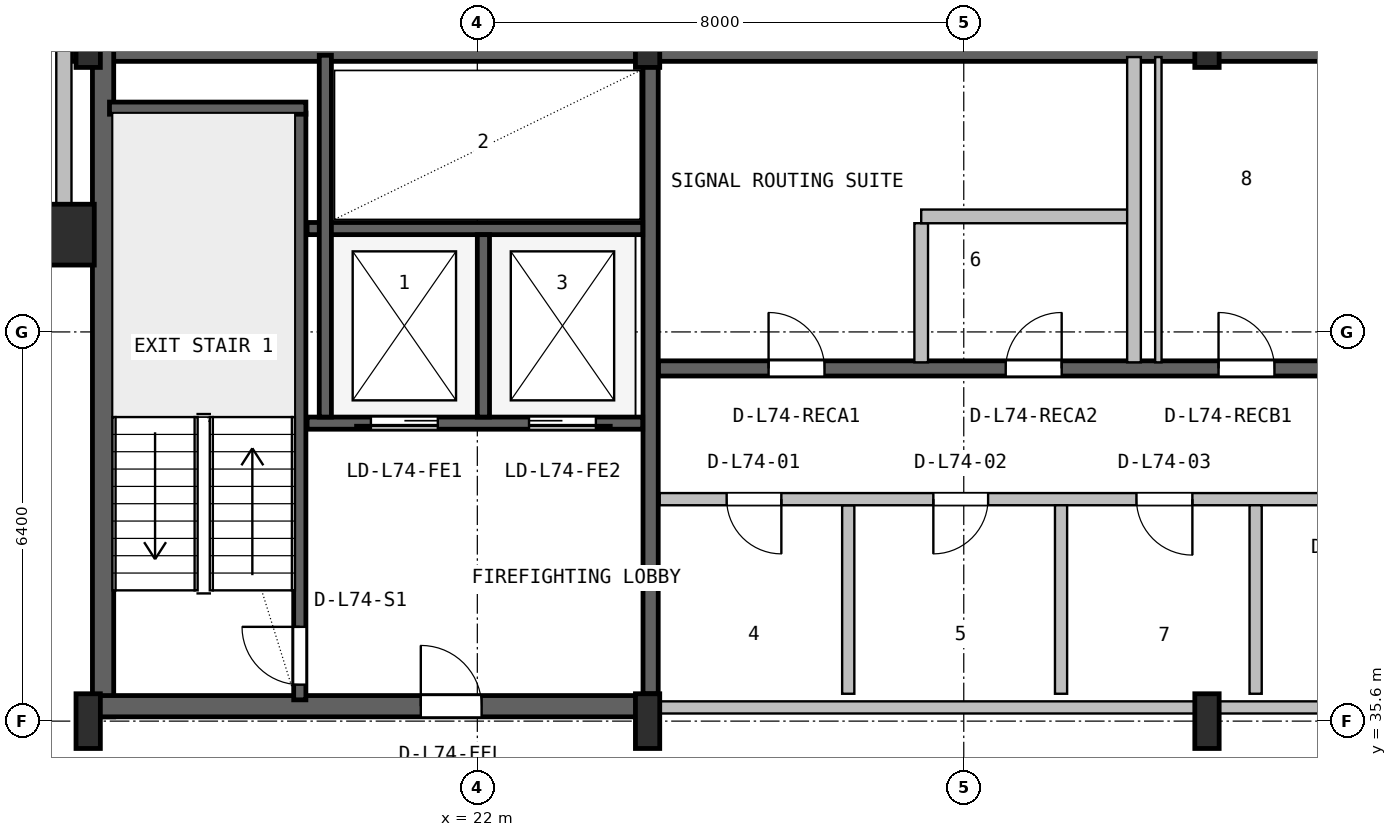
"""IFC4 building model, lengths in metres.
Left out: names, types, materials, properties, quantities, classifications, styles, units other than length and angle.
Written with IfcOpenShell. Run it as: python <this file> out.ifc"""

import sys

from ifc_helpers import new_model, si_unit, direction, frame, frame_2d, origin, origin_2d, place, context, subcontext, project, spatial, rectangle, hollow_rectangle, i_section, extrude, source, transform, mapped, element, fill, save


model = new_model("IFC4")
c1 = context("Model", 3, precision=1e-05, world=origin(), true_north=direction((0.0, 1.0)))
c2 = subcontext(c1, "Body", "Model", "MODEL_VIEW")
j1 = project(units=[si_unit("LENGTHUNIT", "METRE"), si_unit("PLANEANGLEUNIT", "RADIAN")], contexts=[c1])
p1 = place(None, origin())
s1 = spatial("IfcSite", under=j1, at=p1, CompositionType="ELEMENT")
p2 = place(p1, origin())
s2 = spatial("IfcBuilding", under=s1, at=p2, CompositionType="ELEMENT")
p3 = place(p2, frame((0.0, 0.0, 296.4)))
s3 = spatial("IfcBuildingStorey", under=s2, at=p3, CompositionType="ELEMENT", Elevation=296.4)
p4 = place(p3, frame((15.325, 46.625, 0.0), z_axis=(0.0, 0.0, 1.0), x_axis=(1.0, 0.0, 0.0)))
e1 = element("IfcWall", 1, at=p4, inside=s3, PredefinedType="SHEAR", context=c2, shape_type="SweptSolid", body=[
    extrude(rectangle(XDim=37.35, YDim=0.35, at=frame_2d((18.675, 0.0))), origin(), (0.0, 0.0, 1.0), 3.52),
])
p5 = place(p3, frame((15.845, 35.67, 0.0), z_axis=(0.0, 0.0, 1.0), x_axis=(0.0, 1.0, 0.0)))
e2 = element("IfcWall", 2, at=p5, inside=s3, PredefinedType="SHEAR", context=c2, shape_type="SweptSolid", body=[
    extrude(rectangle(XDim=11.13, YDim=0.35, at=frame_2d((5.565, 0.0))), origin(), (0.0, 0.0, 1.0), 3.52),
])
p6 = place(p3, frame((15.67, 35.845, 0.0), z_axis=(0.0, 0.0, 1.0), x_axis=(1.0, 0.0, 0.0)))
e3 = element("IfcWall", 3, at=p6, inside=s3, PredefinedType="SHEAR", context=c2, shape_type="SweptSolid", body=[
    extrude(rectangle(XDim=9.13, YDim=0.35, at=frame_2d((4.565, 0.0))), origin(), (0.0, 0.0, 1.0), 3.52),
])
p7 = place(p6, frame((5.4, 0.0, 0.0)))
e4 = element("IfcOpeningElement", 4, at=p7, cuts=e3, PredefinedType="OPENING", context=c2, shape_type="SweptSolid", body=[
    extrude(rectangle(XDim=1.0, YDim=2.1, at=frame_2d((0.5, 1.05))), frame((0.0, 0.185, 0.0), z_axis=(0.0, -1.0, 0.0), x_axis=(1.0, 0.0, 0.0)), (0.0, 0.0, 1.0), 0.37),
])
m1 = source(origin(), c2, "Body", "SweptSolid", [
    extrude(i_section(OverallWidth=0.4, OverallDepth=0.9, WebThickness=0.016, FlangeThickness=0.028, FilletRadius=0.016, at=origin_2d()), origin(), (0.0, 0.0, 1.0), 3.8),
])
for number, where, z_axis, x_axis in (
    (5, (15.6, 35.6, 0.0), (0.0, 0.0, 1.0), (1.0, 0.0, 0.0)),
    (6, (15.6, 46.8, 0.0), (0.0, 0.0, 1.0), (1.0, 0.0, 0.0)),
    (7, (24.8, 35.6, 0.0), (0.0, 0.0, 1.0), (1.0, 0.0, 0.0)),
    (8, (24.8, 46.8, 0.0), (0.0, 0.0, 1.0), (1.0, 0.0, 0.0)),
    (9, (34.0, 35.6, 0.0), (0.0, 0.0, 1.0), (1.0, 0.0, 0.0)),
    (10, (34.0, 46.8, 0.0), (0.0, 0.0, 1.0), (1.0, 0.0, 0.0)),
):
    element("IfcColumn", number, at=place(p3, frame(where, z_axis=z_axis, x_axis=x_axis)), inside=s3, PredefinedType="COLUMN", context=c2, shape_type="MappedRepresentation", body=[
        mapped(m1, transform((0.0, 0.0, 0.0), x_axis=(1.0, 0.0, 0.0), y_axis=(0.0, 1.0, 0.0), z_axis=(0.0, 0.0, 1.0), scale=1.0)),
    ])
m2 = source(origin(), c2, "Body", "SweptSolid", [
    extrude(hollow_rectangle(XDim=1.0, YDim=1.0, WallThickness=0.04, at=origin_2d()), origin(), (0.0, 0.0, 1.0), 3.8),
])
p8 = place(p3, frame((15.2, 43.6, 0.0), z_axis=(0.0, 0.0, 1.0), x_axis=(1.0, 0.0, 0.0)))
e11 = element("IfcColumn", 11, at=p8, inside=s3, PredefinedType="COLUMN", context=c2, shape_type="MappedRepresentation", body=[
    mapped(m2, transform((0.0, 0.0, 0.0), x_axis=(1.0, 0.0, 0.0), y_axis=(0.0, 1.0, 0.0), z_axis=(0.0, 0.0, 1.0), scale=1.0)),
])
p9 = place(p3, frame((12.08, 43.6, 0.0), z_axis=(0.0, 0.0, 1.0), x_axis=(1.0, 0.0, 0.0)))
e12 = element("IfcWall", 12, at=p9, inside=s3, PredefinedType="SOLIDWALL", context=c2, shape_type="SweptSolid", body=[
    extrude(rectangle(XDim=2.99, YDim=0.25, at=frame_2d((1.495, 0.0))), origin(), (0.0, 0.0, 1.0), 3.5),
])
p10 = place(p3, frame((15.2, 43.52, 0.0), z_axis=(0.0, 0.0, 1.0), x_axis=(0.0, 1.0, 0.0)))
e13 = element("IfcWall", 13, at=p10, inside=s3, PredefinedType="SOLIDWALL", context=c2, shape_type="SweptSolid", body=[
    extrude(rectangle(XDim=3.2, YDim=0.25, at=frame_2d((1.6, 0.0))), origin(), (0.0, 0.0, 1.0), 3.141),
])
p11 = place(p3, frame((19.08, 35.95, 0.0), z_axis=(0.0, 0.0, 1.0), x_axis=(0.0, 1.0, 0.0)))
e14 = element("IfcWall", 14, at=p11, inside=s3, PredefinedType="SHEAR", context=c2, shape_type="SweptSolid", body=[
    extrude(rectangle(XDim=9.65, YDim=0.2, at=frame_2d((4.825, 0.0))), origin(), (0.0, 0.0, 1.0), 3.52),
])
p12 = place(p11, frame((0.25, 0.0, 0.0)))
e15 = element("IfcOpeningElement", 15, at=p12, cuts=e14, PredefinedType="OPENING", context=c2, shape_type="SweptSolid", body=[
    extrude(rectangle(XDim=0.95, YDim=2.1, at=frame_2d((0.475, 1.05))), frame((0.0, 0.11, 0.0), z_axis=(0.0, -1.0, 0.0), x_axis=(1.0, 0.0, 0.0)), (0.0, 0.0, 1.0), 0.22),
])
p13 = place(p3, frame((15.95, 45.68, 0.0), z_axis=(0.0, 0.0, 1.0), x_axis=(1.0, 0.0, 0.0)))
e16 = element("IfcWall", 16, at=p13, inside=s3, PredefinedType="SHEAR", context=c2, shape_type="SweptSolid", body=[
    extrude(rectangle(XDim=3.23, YDim=0.2, at=frame_2d((1.615, 0.0))), origin(), (0.0, 0.0, 1.0), 3.52),
])
p14 = place(p3, frame((24.85, 36.05, 0.0), z_axis=(0.0, 0.0, 1.0), x_axis=(0.0, 1.0, 0.0)))
e17 = element("IfcWall", 17, at=p14, inside=s3, PredefinedType="SHEAR", context=c2, shape_type="SweptSolid", body=[
    extrude(rectangle(XDim=10.45, YDim=0.25, at=frame_2d((5.225, 0.0))), origin(), (0.0, 0.0, 1.0), 3.52),
])
p15 = place(p3, frame((19.2, 40.5, 0.0), z_axis=(0.0, 0.0, 1.0), x_axis=(1.0, 0.0, 0.0)))
e18 = element("IfcWall", 18, at=p15, inside=s3, PredefinedType="SHEAR", context=c2, shape_type="SweptSolid", body=[
    extrude(rectangle(XDim=5.52, YDim=0.2, at=frame_2d((2.76, 0.0))), origin(), (0.0, 0.0, 1.0), 3.52),
])
p16 = place(p15, frame((1.05, 0.0, 0.0)))
e19 = element("IfcOpeningElement", 19, at=p16, cuts=e18, PredefinedType="OPENING", context=c2, shape_type="SweptSolid", body=[
    extrude(rectangle(XDim=1.1, YDim=2.18, at=frame_2d((0.55, 1.09))), frame((0.0, 0.11, 0.0), z_axis=(0.0, -1.0, 0.0), x_axis=(1.0, 0.0, 0.0)), (0.0, 0.0, 1.0), 0.22),
])
p17 = place(p15, frame((3.65, 0.0, 0.0)))
e20 = element("IfcOpeningElement", 20, at=p17, cuts=e18, PredefinedType="OPENING", context=c2, shape_type="SweptSolid", body=[
    extrude(rectangle(XDim=1.1, YDim=2.18, at=frame_2d((0.55, 1.09))), frame((0.0, 0.11, 0.0), z_axis=(0.0, -1.0, 0.0), x_axis=(1.0, 0.0, 0.0)), (0.0, 0.0, 1.0), 0.22),
])
p18 = place(p3, frame((19.2, 43.7, 0.0), z_axis=(0.0, 0.0, 1.0), x_axis=(1.0, 0.0, 0.0)))
e21 = element("IfcWall", 21, at=p18, inside=s3, PredefinedType="SHEAR", context=c2, shape_type="SweptSolid", body=[
    extrude(rectangle(XDim=5.52, YDim=0.2, at=frame_2d((2.76, 0.0))), origin(), (0.0, 0.0, 1.0), 3.52),
])
p19 = place(p3, frame((22.1, 40.6, 0.0), z_axis=(0.0, 0.0, 1.0), x_axis=(0.0, 1.0, 0.0)))
e22 = element("IfcWall", 22, at=p19, inside=s3, PredefinedType="SHEAR", context=c2, shape_type="SweptSolid", body=[
    extrude(rectangle(XDim=3.0, YDim=0.2, at=frame_2d((1.5, 0.0))), origin(), (0.0, 0.0, 1.0), 3.52),
])
p20 = place(p3, frame((19.5, 40.6, 0.0), z_axis=(0.0, 0.0, 1.0), x_axis=(0.0, 1.0, 0.0)))
e23 = element("IfcWall", 23, at=p20, inside=s3, PredefinedType="SHEAR", context=c2, shape_type="SweptSolid", body=[
    extrude(rectangle(XDim=5.95, YDim=0.2, at=frame_2d((2.975, 0.0))), origin(), (0.0, 0.0, 1.0), 3.52),
])
p21 = place(p3, frame((24.98, 41.4, 0.0), z_axis=(0.0, 0.0, 1.0), x_axis=(1.0, 0.0, 0.0)))
e24 = element("IfcWall", 24, at=p21, inside=s3, PredefinedType="SHEAR", context=c2, shape_type="SweptSolid", body=[
    extrude(rectangle(XDim=23.82, YDim=0.25, at=frame_2d((11.91, 0.0))), origin(), (0.0, 0.0, 1.0), 3.52),
])
p22 = place(p21, frame((16.87, 0.0, 0.0)))
e25 = element("IfcOpeningElement", 25, at=p22, cuts=e24, PredefinedType="OPENING", context=c2, shape_type="SweptSolid", body=[
    extrude(rectangle(XDim=1.1, YDim=2.18, at=frame_2d((0.55, 1.09))), frame((0.0, 0.135, 0.0), z_axis=(0.0, -1.0, 0.0), x_axis=(1.0, 0.0, 0.0)), (0.0, 0.0, 1.0), 0.27),
])
p23 = place(p21, frame((19.47, 0.0, 0.0)))
e26 = element("IfcOpeningElement", 26, at=p23, cuts=e24, PredefinedType="OPENING", context=c2, shape_type="SweptSolid", body=[
    extrude(rectangle(XDim=1.1, YDim=2.18, at=frame_2d((0.55, 1.09))), frame((0.0, 0.135, 0.0), z_axis=(0.0, -1.0, 0.0), x_axis=(1.0, 0.0, 0.0)), (0.0, 0.0, 1.0), 0.27),
])
p24 = place(p21, frame((22.07, 0.0, 0.0)))
e27 = element("IfcOpeningElement", 27, at=p24, cuts=e24, PredefinedType="OPENING", context=c2, shape_type="SweptSolid", body=[
    extrude(rectangle(XDim=1.1, YDim=2.18, at=frame_2d((0.55, 1.09))), frame((0.0, 0.135, 0.0), z_axis=(0.0, -1.0, 0.0), x_axis=(1.0, 0.0, 0.0)), (0.0, 0.0, 1.0), 0.27),
])
p25 = place(p21, frame((1.81, 0.0, 0.0)))
e28 = element("IfcOpeningElement", 28, at=p25, cuts=e24, PredefinedType="OPENING", context=c2, shape_type="SweptSolid", body=[
    extrude(rectangle(XDim=0.92, YDim=2.08, at=frame_2d((0.46, 1.04))), frame((0.0, 0.135, 0.0), z_axis=(0.0, -1.0, 0.0), x_axis=(1.0, 0.0, 0.0)), (0.0, 0.0, 1.0), 0.27),
])
p26 = place(p21, frame((5.71, 0.0, 0.0)))
e29 = element("IfcOpeningElement", 29, at=p26, cuts=e24, PredefinedType="OPENING", context=c2, shape_type="SweptSolid", body=[
    extrude(rectangle(XDim=0.92, YDim=2.08, at=frame_2d((0.46, 1.04))), frame((0.0, 0.135, 0.0), z_axis=(0.0, -1.0, 0.0), x_axis=(1.0, 0.0, 0.0)), (0.0, 0.0, 1.0), 0.27),
])
p27 = place(p21, frame((9.21, 0.0, 0.0)))
e30 = element("IfcOpeningElement", 30, at=p27, cuts=e24, PredefinedType="OPENING", context=c2, shape_type="SweptSolid", body=[
    extrude(rectangle(XDim=0.92, YDim=2.08, at=frame_2d((0.46, 1.04))), frame((0.0, 0.135, 0.0), z_axis=(0.0, -1.0, 0.0), x_axis=(1.0, 0.0, 0.0)), (0.0, 0.0, 1.0), 0.27),
])
p28 = place(p21, frame((11.96, 0.0, 0.0)))
e31 = element("IfcOpeningElement", 31, at=p28, cuts=e24, PredefinedType="OPENING", context=c2, shape_type="SweptSolid", body=[
    extrude(rectangle(XDim=0.92, YDim=2.08, at=frame_2d((0.46, 1.04))), frame((0.0, 0.135, 0.0), z_axis=(0.0, -1.0, 0.0), x_axis=(1.0, 0.0, 0.0)), (0.0, 0.0, 1.0), 0.27),
])
p29 = place(p21, frame((14.31, 0.0, 0.0)))
e32 = element("IfcOpeningElement", 32, at=p29, cuts=e24, PredefinedType="OPENING", context=c2, shape_type="SweptSolid", body=[
    extrude(rectangle(XDim=0.92, YDim=2.08, at=frame_2d((0.46, 1.04))), frame((0.0, 0.135, 0.0), z_axis=(0.0, -1.0, 0.0), x_axis=(1.0, 0.0, 0.0)), (0.0, 0.0, 1.0), 0.27),
])
p30 = place(p3, frame((25.0, 35.825, 0.0), z_axis=(0.0, 0.0, 1.0), x_axis=(1.0, 0.0, 0.0)))
e33 = element("IfcWall", 33, at=p30, inside=s3, PredefinedType="SOLIDWALL", context=c2, shape_type="SweptSolid", body=[
    extrude(rectangle(XDim=12.95, YDim=0.2, at=frame_2d((6.475, 0.0))), origin(), (0.0, 0.0, 1.0), 2.545),
])
p31 = place(p3, frame((28.1, 36.05, 0.0), z_axis=(0.0, 0.0, 1.0), x_axis=(0.0, 1.0, 0.0)))
e34 = element("IfcWall", 34, at=p31, inside=s3, PredefinedType="PLUMBINGWALL", context=c2, shape_type="SweptSolid", body=[
    extrude(rectangle(XDim=3.1, YDim=0.2, at=frame_2d((1.55, 0.0))), origin(), (0.0, 0.0, 1.0), 3.5),
])
p32 = place(p3, frame((25.0, 39.25, 0.0), z_axis=(0.0, 0.0, 1.0), x_axis=(1.0, 0.0, 0.0)))
e35 = element("IfcWall", 35, at=p32, inside=s3, PredefinedType="SOLIDWALL", context=c2, shape_type="SweptSolid", body=[
    extrude(rectangle(XDim=12.95, YDim=0.2, at=frame_2d((6.475, 0.0))), origin(), (0.0, 0.0, 1.0), 3.5),
])
p33 = place(p32, frame((1.1, 0.0, 0.0)))
e36 = element("IfcOpeningElement", 36, at=p33, cuts=e35, PredefinedType="OPENING", context=c2, shape_type="SweptSolid", body=[
    extrude(rectangle(XDim=0.9, YDim=2.06, at=frame_2d((0.45, 1.03))), frame((0.0, 0.11, 0.0), z_axis=(0.0, -1.0, 0.0), x_axis=(1.0, 0.0, 0.0)), (0.0, 0.0, 1.0), 0.22),
])
p34 = place(p32, frame((4.5, 0.0, 0.0)))
e37 = element("IfcOpeningElement", 37, at=p34, cuts=e35, PredefinedType="OPENING", context=c2, shape_type="SweptSolid", body=[
    extrude(rectangle(XDim=0.9, YDim=2.06, at=frame_2d((0.45, 1.03))), frame((0.0, 0.11, 0.0), z_axis=(0.0, -1.0, 0.0), x_axis=(1.0, 0.0, 0.0)), (0.0, 0.0, 1.0), 0.22),
])
p35 = place(p32, frame((7.84, 0.0, 0.0)))
e38 = element("IfcOpeningElement", 38, at=p35, cuts=e35, PredefinedType="OPENING", context=c2, shape_type="SweptSolid", body=[
    extrude(rectangle(XDim=0.92, YDim=2.08, at=frame_2d((0.46, 1.04))), frame((0.0, 0.11, 0.0), z_axis=(0.0, -1.0, 0.0), x_axis=(1.0, 0.0, 0.0)), (0.0, 0.0, 1.0), 0.22),
])
p36 = place(p32, frame((10.875, 0.0, 0.0)))
e39 = element("IfcOpeningElement", 39, at=p36, cuts=e35, PredefinedType="OPENING", context=c2, shape_type="SweptSolid", body=[
    extrude(rectangle(XDim=1.2, YDim=2.1, at=frame_2d((0.6, 1.05))), frame((0.0, 0.11, 0.0), z_axis=(0.0, -1.0, 0.0), x_axis=(1.0, 0.0, 0.0)), (0.0, 0.0, 1.0), 0.22),
])
p37 = place(p3, frame((31.6, 36.05, 0.0), z_axis=(0.0, 0.0, 1.0), x_axis=(0.0, 1.0, 0.0)))
e40 = element("IfcWall", 40, at=p37, inside=s3, PredefinedType="PLUMBINGWALL", context=c2, shape_type="SweptSolid", body=[
    extrude(rectangle(XDim=3.1, YDim=0.2, at=frame_2d((1.55, 0.0))), origin(), (0.0, 0.0, 1.0), 3.5),
])
p38 = place(p3, frame((34.8, 36.05, 0.0), z_axis=(0.0, 0.0, 1.0), x_axis=(0.0, 1.0, 0.0)))
e41 = element("IfcWall", 41, at=p38, inside=s3, PredefinedType="SOLIDWALL", context=c2, shape_type="SweptSolid", body=[
    extrude(rectangle(XDim=3.1, YDim=0.2, at=frame_2d((1.55, 0.0))), origin(), (0.0, 0.0, 1.0), 3.5),
])
p39 = place(p3, frame((29.3, 41.5, 0.0), z_axis=(0.0, 0.0, 1.0), x_axis=(0.0, 1.0, 0.0)))
e42 = element("IfcWall", 42, at=p39, inside=s3, PredefinedType="PARTITIONING", context=c2, shape_type="SweptSolid", body=[
    extrude(rectangle(XDim=2.288, YDim=0.225, at=frame_2d((1.144, 0.0))), origin(), (0.0, 0.0, 1.0), 3.5),
])
p40 = place(p3, frame((29.3, 43.9, 0.0), z_axis=(0.0, 0.0, 1.0), x_axis=(1.0, 0.0, 0.0)))
e43 = element("IfcWall", 43, at=p40, inside=s3, PredefinedType="PARTITIONING", context=c2, shape_type="SweptSolid", body=[
    extrude(rectangle(XDim=3.5, YDim=0.225, at=frame_2d((1.75, 0.0))), origin(), (0.0, 0.0, 1.0), 3.5),
])
p41 = place(p3, frame((32.8, 41.5, 0.0), z_axis=(0.0, 0.0, 1.0), x_axis=(0.0, 1.0, 0.0)))
e44 = element("IfcWall", 44, at=p41, inside=s3, PredefinedType="PARTITIONING", context=c2, shape_type="SweptSolid", body=[
    extrude(rectangle(XDim=5.02, YDim=0.225, at=frame_2d((2.51, 0.0))), origin(), (0.0, 0.0, 1.0), 3.5),
])
p42 = place(p3, frame((33.2, 41.5, 0.0), z_axis=(0.0, 0.0, 1.0), x_axis=(0.0, 1.0, 0.0)))
e45 = element("IfcWall", 45, at=p42, inside=s3, PredefinedType="PARTITIONING", context=c2, shape_type="SweptSolid", body=[
    extrude(rectangle(XDim=5.02, YDim=0.105, at=frame_2d((2.51, 0.0))), origin(), (0.0, 0.0, 1.0), 3.5),
])
m3 = source(origin(), c2, "Body", "SweptSolid", [
    extrude(rectangle(XDim=0.95, YDim=2.1, at=frame_2d((0.475, 1.05))), frame((0.0, 0.025, 0.0), z_axis=(0.0, -1.0, 0.0), x_axis=(1.0, 0.0, 0.0)), (0.0, 0.0, 1.0), 0.05),
])
p43 = place(p12, origin())
e46 = element("IfcDoor", 46, at=p43, inside=s3, OperationType="SINGLE_SWING_RIGHT", PredefinedType="DOOR", context=c2, shape_type="MappedRepresentation", body=[
    mapped(m3, transform((0.0, 0.0, 0.0), x_axis=(1.0, 0.0, 0.0), y_axis=(0.0, 1.0, 0.0), z_axis=(0.0, 0.0, 1.0), scale=1.0)),
])
fill(e15, e46)
m4 = source(origin(), c2, "Body", "SweptSolid", [
    extrude(rectangle(XDim=1.0, YDim=2.1, at=frame_2d((0.5, 1.05))), frame((0.0, 0.025, 0.0), z_axis=(0.0, -1.0, 0.0), x_axis=(1.0, 0.0, 0.0)), (0.0, 0.0, 1.0), 0.05),
])
p44 = place(p7, origin())
e47 = element("IfcDoor", 47, at=p44, inside=s3, OperationType="SINGLE_SWING_LEFT", PredefinedType="DOOR", context=c2, shape_type="MappedRepresentation", body=[
    mapped(m4, transform((0.0, 0.0, 0.0), x_axis=(1.0, 0.0, 0.0), y_axis=(0.0, 1.0, 0.0), z_axis=(0.0, 0.0, 1.0), scale=1.0)),
])
fill(e4, e47)
m5 = source(origin(), c2, "Body", "SweptSolid", [
    extrude(rectangle(XDim=1.1, YDim=2.18, at=frame_2d((0.55, 1.09))), frame((0.0, 0.025, 0.0), z_axis=(0.0, -1.0, 0.0), x_axis=(1.0, 0.0, 0.0)), (0.0, 0.0, 1.0), 0.05),
])
p45 = place(p16, frame((1.1, 0.0, 0.0), z_axis=(0.0, 0.0, 1.0), x_axis=(-1.0, 0.0, 0.0)))
e48 = element("IfcDoor", 48, at=p45, inside=s3, OperationType="SLIDING_TO_LEFT", PredefinedType="DOOR", context=c2, shape_type="MappedRepresentation", body=[
    mapped(m5, transform((0.0, 0.0, 0.0), x_axis=(1.0, 0.0, 0.0), y_axis=(0.0, 1.0, 0.0), z_axis=(0.0, 0.0, 1.0), scale=1.0)),
])
fill(e19, e48)
p46 = place(p17, frame((1.1, 0.0, 0.0), z_axis=(0.0, 0.0, 1.0), x_axis=(-1.0, 0.0, 0.0)))
e49 = element("IfcDoor", 49, at=p46, inside=s3, OperationType="SLIDING_TO_RIGHT", PredefinedType="DOOR", context=c2, shape_type="MappedRepresentation", body=[
    mapped(m5, transform((0.0, 0.0, 0.0), x_axis=(1.0, 0.0, 0.0), y_axis=(0.0, 1.0, 0.0), z_axis=(0.0, 0.0, 1.0), scale=1.0)),
])
fill(e20, e49)
m6 = source(origin(), c2, "Body", "SweptSolid", [
    extrude(rectangle(XDim=0.92, YDim=2.08, at=frame_2d((0.46, 1.04))), frame((0.0, 0.025, 0.0), z_axis=(0.0, -1.0, 0.0), x_axis=(1.0, 0.0, 0.0)), (0.0, 0.0, 1.0), 0.05),
])
p47 = place(p25, origin())
e50 = element("IfcDoor", 50, at=p47, inside=s3, OperationType="SINGLE_SWING_LEFT", PredefinedType="DOOR", context=c2, shape_type="MappedRepresentation", body=[
    mapped(m6, transform((0.0, 0.0, 0.0), x_axis=(1.0, 0.0, 0.0), y_axis=(0.0, 1.0, 0.0), z_axis=(0.0, 0.0, 1.0), scale=1.0)),
])
fill(e28, e50)
p48 = place(p26, origin())
e51 = element("IfcDoor", 51, at=p48, inside=s3, OperationType="SINGLE_SWING_RIGHT", PredefinedType="DOOR", context=c2, shape_type="MappedRepresentation", body=[
    mapped(m6, transform((0.0, 0.0, 0.0), x_axis=(1.0, 0.0, 0.0), y_axis=(0.0, 1.0, 0.0), z_axis=(0.0, 0.0, 1.0), scale=1.0)),
])
fill(e29, e51)
p49 = place(p27, origin())
e52 = element("IfcDoor", 52, at=p49, inside=s3, OperationType="SINGLE_SWING_LEFT", PredefinedType="DOOR", context=c2, shape_type="MappedRepresentation", body=[
    mapped(m6, transform((0.0, 0.0, 0.0), x_axis=(1.0, 0.0, 0.0), y_axis=(0.0, 1.0, 0.0), z_axis=(0.0, 0.0, 1.0), scale=1.0)),
])
fill(e30, e52)
m7 = source(origin(), c2, "Body", "SweptSolid", [
    extrude(rectangle(XDim=0.9, YDim=2.06, at=frame_2d((0.45, 1.03))), frame((0.0, 0.025, 0.0), z_axis=(0.0, -1.0, 0.0), x_axis=(1.0, 0.0, 0.0)), (0.0, 0.0, 1.0), 0.05),
])
p50 = place(p33, frame((0.9, 0.0, 0.0), z_axis=(0.0, 0.0, 1.0), x_axis=(-1.0, 0.0, 0.0)))
e53 = element("IfcDoor", 53, at=p50, inside=s3, OperationType="SINGLE_SWING_RIGHT", PredefinedType="DOOR", context=c2, shape_type="MappedRepresentation", body=[
    mapped(m7, transform((0.0, 0.0, 0.0), x_axis=(1.0, 0.0, 0.0), y_axis=(0.0, 1.0, 0.0), z_axis=(0.0, 0.0, 1.0), scale=1.0)),
])
fill(e36, e53)
p51 = place(p34, frame((0.9, 0.0, 0.0), z_axis=(0.0, 0.0, 1.0), x_axis=(-1.0, 0.0, 0.0)))
e54 = element("IfcDoor", 54, at=p51, inside=s3, OperationType="SINGLE_SWING_LEFT", PredefinedType="DOOR", context=c2, shape_type="MappedRepresentation", body=[
    mapped(m7, transform((0.0, 0.0, 0.0), x_axis=(1.0, 0.0, 0.0), y_axis=(0.0, 1.0, 0.0), z_axis=(0.0, 0.0, 1.0), scale=1.0)),
])
fill(e37, e54)
p52 = place(p35, frame((0.92, 0.0, 0.0), z_axis=(0.0, 0.0, 1.0), x_axis=(-1.0, 0.0, 0.0)))
e55 = element("IfcDoor", 55, at=p52, inside=s3, OperationType="SINGLE_SWING_RIGHT", PredefinedType="DOOR", context=c2, shape_type="MappedRepresentation", body=[
    mapped(m6, transform((0.0, 0.0, 0.0), x_axis=(1.0, 0.0, 0.0), y_axis=(0.0, 1.0, 0.0), z_axis=(0.0, 0.0, 1.0), scale=1.0)),
])
fill(e38, e55)
save(model, sys.argv[1])
